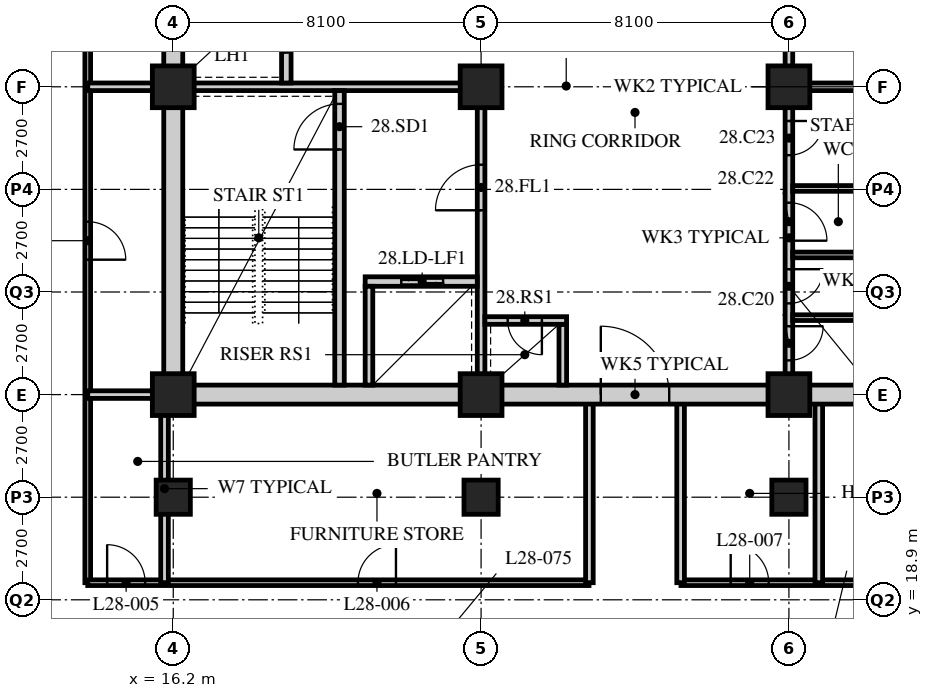
"""IFC4 building model, lengths in metres.
Left out: names, types, materials, properties, quantities, classifications, styles, units other than length and angle.
Written with IfcOpenShell. Run it as: python <this file> out.ifc"""

import sys

from ifc_helpers import new_model, si_unit, direction, frame, frame_2d, origin, origin_2d, place, context, subcontext, project, spatial, rectangle, hollow_rectangle, extrude, element, fill, save


model = new_model("IFC4")
c1 = context("Model", 3, precision=1e-05, world=origin(), true_north=direction((0.0, 1.0)))
c2 = subcontext(c1, "Body", "Model", "MODEL_VIEW")
j1 = project(units=[si_unit("LENGTHUNIT", "METRE"), si_unit("PLANEANGLEUNIT", "RADIAN")], contexts=[c1])
p1 = place(None, origin())
s1 = spatial("IfcSite", under=j1, at=p1, CompositionType="ELEMENT")
p2 = place(p1, origin())
s2 = spatial("IfcBuilding", under=s1, at=p2, CompositionType="ELEMENT")
p3 = place(p2, frame((0.0, 0.0, 113.6)))
s3 = spatial("IfcBuildingStorey", under=s2, at=p3, CompositionType="ELEMENT", Elevation=113.6)
p4 = place(p3, frame((16.2, 21.6, 0.0), z_axis=(0.0, 0.0, 1.0), x_axis=(1.0, 0.0, 0.0)))
e1 = element("IfcColumn", 1, at=p4, inside=s3, PredefinedType="COLUMN", context=c2, shape_type="SweptSolid", body=[
    extrude(hollow_rectangle(XDim=0.9, YDim=0.9, WallThickness=0.09, at=origin_2d()), origin(), (0.0, 0.0, 1.0), 3.4),
])
for number, where, z_axis, x_axis in (
    (2, (16.2, 24.3, 0.0), (0.0, 0.0, 1.0), (1.0, 0.0, 0.0)),
    (3, (16.2, 32.4, 0.0), (0.0, 0.0, 1.0), (1.0, 0.0, 0.0)),
):
    element("IfcColumn", number, at=place(p3, frame(where, z_axis=z_axis, x_axis=x_axis)), inside=s3, PredefinedType="COLUMN", context=c2, shape_type="SweptSolid", body=[
        extrude(hollow_rectangle(XDim=1.1, YDim=1.1, WallThickness=0.1, at=origin_2d()), origin(), (0.0, 0.0, 1.0), 3.4),
    ])
p5 = place(p3, frame((24.3, 21.6, 0.0), z_axis=(0.0, 0.0, 1.0), x_axis=(1.0, 0.0, 0.0)))
e4 = element("IfcColumn", 4, at=p5, inside=s3, PredefinedType="COLUMN", context=c2, shape_type="SweptSolid", body=[
    extrude(hollow_rectangle(XDim=0.9, YDim=0.9, WallThickness=0.09, at=origin_2d()), origin(), (0.0, 0.0, 1.0), 3.4),
])
for number, where, z_axis, x_axis in (
    (5, (24.3, 24.3, 0.0), (0.0, 0.0, 1.0), (1.0, 0.0, 0.0)),
    (6, (24.3, 32.4, 0.0), (0.0, 0.0, 1.0), (1.0, 0.0, 0.0)),
):
    element("IfcColumn", number, at=place(p3, frame(where, z_axis=z_axis, x_axis=x_axis)), inside=s3, PredefinedType="COLUMN", context=c2, shape_type="SweptSolid", body=[
        extrude(hollow_rectangle(XDim=1.1, YDim=1.1, WallThickness=0.1, at=origin_2d()), origin(), (0.0, 0.0, 1.0), 3.4),
    ])
p6 = place(p3, frame((32.4, 21.6, 0.0), z_axis=(0.0, 0.0, 1.0), x_axis=(1.0, 0.0, 0.0)))
e7 = element("IfcColumn", 7, at=p6, inside=s3, PredefinedType="COLUMN", context=c2, shape_type="SweptSolid", body=[
    extrude(hollow_rectangle(XDim=0.9, YDim=0.9, WallThickness=0.09, at=origin_2d()), origin(), (0.0, 0.0, 1.0), 3.4),
])
for number, where, z_axis, x_axis in (
    (8, (32.4, 24.3, 0.0), (0.0, 0.0, 1.0), (1.0, 0.0, 0.0)),
    (9, (32.4, 32.4, 0.0), (0.0, 0.0, 1.0), (1.0, 0.0, 0.0)),
):
    element("IfcColumn", number, at=place(p3, frame(where, z_axis=z_axis, x_axis=x_axis)), inside=s3, PredefinedType="COLUMN", context=c2, shape_type="SweptSolid", body=[
        extrude(hollow_rectangle(XDim=1.1, YDim=1.1, WallThickness=0.1, at=origin_2d()), origin(), (0.0, 0.0, 1.0), 3.4),
    ])
p7 = place(p3, frame((13.95, 44.1, 0.0), z_axis=(0.0, 0.0, 1.0), x_axis=(0.0, -1.0, 0.0)))
e10 = element("IfcWall", 10, at=p7, inside=s3, PredefinedType="PARTITIONING", context=c2, shape_type="SweptSolid", body=[
    extrude(rectangle(XDim=24.75, YDim=0.15, at=frame_2d((12.375, 0.0))), origin(), (0.0, 0.0, 1.0), 3.19),
])
p8 = place(p7, frame((15.25, 0.0, 0.0)))
e11 = element("IfcOpeningElement", 11, at=p8, cuts=e10, PredefinedType="OPENING", context=c2, shape_type="SweptSolid", body=[
    extrude(rectangle(XDim=1.0, YDim=2.1, at=frame_2d((0.5, 1.05))), frame((0.0, 0.085, 0.0), z_axis=(0.0, -1.0, 0.0), x_axis=(1.0, 0.0, 0.0)), (0.0, 0.0, 1.0), 0.17),
])
p9 = place(p7, frame((7.15, 0.0, 0.0)))
e12 = element("IfcOpeningElement", 12, at=p9, cuts=e10, PredefinedType="OPENING", context=c2, shape_type="SweptSolid", body=[
    extrude(rectangle(XDim=1.0, YDim=2.1, at=frame_2d((0.5, 1.05))), frame((0.0, 0.085, 0.0), z_axis=(0.0, -1.0, 0.0), x_axis=(1.0, 0.0, 0.0)), (0.0, 0.0, 1.0), 0.17),
])
p10 = place(p3, frame((13.95, 19.35, 0.0), z_axis=(0.0, 0.0, 1.0), x_axis=(1.0, 0.0, 0.0)))
e13 = element("IfcWall", 13, at=p10, inside=s3, PredefinedType="PARTITIONING", context=c2, shape_type="SweptSolid", body=[
    extrude(rectangle(XDim=13.19, YDim=0.15, at=frame_2d((6.595, 0.0))), origin(), (0.0, 0.0, 1.0), 3.19),
])
p11 = place(p10, frame((0.51, 0.0, 0.0)))
e14 = element("IfcOpeningElement", 14, at=p11, cuts=e13, PredefinedType="OPENING", context=c2, shape_type="SweptSolid", body=[
    extrude(rectangle(XDim=1.0, YDim=2.1, at=frame_2d((0.5, 1.05))), frame((0.0, 0.085, 0.0), z_axis=(0.0, -1.0, 0.0), x_axis=(1.0, 0.0, 0.0)), (0.0, 0.0, 1.0), 0.17),
])
p12 = place(p10, frame((7.11, 0.0, 0.0)))
e15 = element("IfcOpeningElement", 15, at=p12, cuts=e13, PredefinedType="OPENING", context=c2, shape_type="SweptSolid", body=[
    extrude(rectangle(XDim=1.0, YDim=2.1, at=frame_2d((0.5, 1.05))), frame((0.0, 0.085, 0.0), z_axis=(0.0, -1.0, 0.0), x_axis=(1.0, 0.0, 0.0)), (0.0, 0.0, 1.0), 0.17),
])
p13 = place(p3, frame((29.56, 19.35, 0.0), z_axis=(0.0, 0.0, 1.0), x_axis=(1.0, 0.0, 0.0)))
e16 = element("IfcWall", 16, at=p13, inside=s3, PredefinedType="PARTITIONING", context=c2, shape_type="SweptSolid", body=[
    extrude(rectangle(XDim=13.19, YDim=0.15, at=frame_2d((6.595, 0.0))), origin(), (0.0, 0.0, 1.0), 3.19),
])
p14 = place(p13, frame((1.308, 0.0, 0.0)))
e17 = element("IfcOpeningElement", 17, at=p14, cuts=e16, PredefinedType="OPENING", context=c2, shape_type="SweptSolid", body=[
    extrude(rectangle(XDim=1.0, YDim=2.1, at=frame_2d((0.5, 1.05))), frame((0.0, 0.085, 0.0), z_axis=(0.0, -1.0, 0.0), x_axis=(1.0, 0.0, 0.0)), (0.0, 0.0, 1.0), 0.17),
])
p15 = place(p13, frame((7.908, 0.0, 0.0)))
e18 = element("IfcOpeningElement", 18, at=p15, cuts=e16, PredefinedType="OPENING", context=c2, shape_type="SweptSolid", body=[
    extrude(rectangle(XDim=1.0, YDim=2.1, at=frame_2d((0.5, 1.05))), frame((0.0, 0.085, 0.0), z_axis=(0.0, -1.0, 0.0), x_axis=(1.0, 0.0, 0.0)), (0.0, 0.0, 1.0), 0.17),
])
p16 = place(p3, frame((13.95, 32.4, 0.0), z_axis=(0.0, 0.0, 1.0), x_axis=(1.0, 0.0, 0.0)))
e19 = element("IfcWall", 19, at=p16, inside=s3, PredefinedType="SOLIDWALL", context=c2, shape_type="SweptSolid", body=[
    extrude(rectangle(XDim=2.25, YDim=0.2, at=frame_2d((1.125, 0.0))), origin(), (0.0, 0.0, 1.0), 3.19),
])
p17 = place(p3, frame((15.97, 19.35, 0.0), z_axis=(0.0, 0.0, 1.0), x_axis=(0.0, 1.0, 0.0)))
e20 = element("IfcWall", 20, at=p17, inside=s3, PredefinedType="SOLIDWALL", context=c2, shape_type="SweptSolid", body=[
    extrude(rectangle(XDim=4.95, YDim=0.2, at=frame_2d((2.475, 0.0))), origin(), (0.0, 0.0, 1.0), 2.49),
])
for number, where, z_axis, x_axis in (
    (21, (33.186, 19.35, 0.0), (0.0, 0.0, 1.0), (0.0, 1.0, 0.0)),
    (22, (27.15, 19.35, 0.0), (0.0, 0.0, 1.0), (0.0, 1.0, 0.0)),
    (23, (29.55, 19.35, 0.0), (0.0, 0.0, 1.0), (0.0, 1.0, 0.0)),
):
    element("IfcWall", number, at=place(p3, frame(where, z_axis=z_axis, x_axis=x_axis)), inside=s3, PredefinedType="SOLIDWALL", context=c2, shape_type="SweptSolid", body=[
        extrude(rectangle(XDim=4.95, YDim=0.2, at=frame_2d((2.475, 0.0))), origin(), (0.0, 0.0, 1.0), 3.19),
    ])
p18 = place(p3, frame((13.95, 24.3, 0.0), z_axis=(0.0, 0.0, 1.0), x_axis=(1.0, 0.0, 0.0)))
e24 = element("IfcWall", 24, at=p18, inside=s3, PredefinedType="SOLIDWALL", context=c2, shape_type="SweptSolid", body=[
    extrude(rectangle(XDim=2.25, YDim=0.2, at=frame_2d((1.125, 0.0))), origin(), (0.0, 0.0, 1.0), 3.19),
])
p19 = place(p3, frame((15.95, 24.3, 0.0), z_axis=(0.0, 0.0, 1.0), x_axis=(1.0, 0.0, 0.0)))
e25 = element("IfcWall", 25, at=p19, inside=s3, PredefinedType="SOLIDWALL", context=c2, shape_type="SweptSolid", body=[
    extrude(rectangle(XDim=24.8, YDim=0.5, at=frame_2d((12.4, 0.0))), origin(), (0.0, 0.0, 1.0), 2.54),
])
p20 = place(p19, frame((11.5, 0.0, 0.0)))
e26 = element("IfcOpeningElement", 26, at=p20, cuts=e25, PredefinedType="OPENING", context=c2, shape_type="SweptSolid", body=[
    extrude(rectangle(XDim=1.8, YDim=2.4, at=frame_2d((0.9, 1.2))), frame((0.0, 0.26, 0.0), z_axis=(0.0, -1.0, 0.0), x_axis=(1.0, 0.0, 0.0)), (0.0, 0.0, 1.0), 0.52),
])
p21 = place(p3, frame((16.2, 24.55, 0.0), z_axis=(0.0, 0.0, 1.0), x_axis=(0.0, 1.0, 0.0)))
e27 = element("IfcWall", 27, at=p21, inside=s3, PredefinedType="SOLIDWALL", context=c2, shape_type="SweptSolid", body=[
    extrude(rectangle(XDim=15.7, YDim=0.5, at=frame_2d((7.85, 0.0))), origin(), (0.0, 0.0, 1.0), 2.578),
])
p22 = place(p3, frame((16.45, 32.4, 0.0), z_axis=(0.0, 0.0, 1.0), x_axis=(1.0, 0.0, 0.0)))
e28 = element("IfcWall", 28, at=p22, inside=s3, PredefinedType="SOLIDWALL", context=c2, shape_type="SweptSolid", body=[
    extrude(rectangle(XDim=7.95, YDim=0.2, at=frame_2d((3.975, 0.0))), origin(), (0.0, 0.0, 1.0), 2.578),
])
p23 = place(p3, frame((24.3, 24.55, 0.0), z_axis=(0.0, 0.0, 1.0), x_axis=(0.0, 1.0, 0.0)))
e29 = element("IfcWall", 29, at=p23, inside=s3, PredefinedType="SOLIDWALL", context=c2, shape_type="SweptSolid", body=[
    extrude(rectangle(XDim=7.75, YDim=0.2, at=frame_2d((3.875, 0.0))), origin(), (0.0, 0.0, 1.0), 2.578),
])
p24 = place(p23, frame((4.6, 0.0, 0.0)))
e30 = element("IfcOpeningElement", 30, at=p24, cuts=e29, PredefinedType="OPENING", context=c2, shape_type="SweptSolid", body=[
    extrude(rectangle(XDim=1.2, YDim=2.1, at=frame_2d((0.6, 1.05))), frame((0.0, 0.11, 0.0), z_axis=(0.0, -1.0, 0.0), x_axis=(1.0, 0.0, 0.0)), (0.0, 0.0, 1.0), 0.22),
])
p25 = place(p3, frame((20.575, 24.55, 0.0), z_axis=(0.0, 0.0, 1.0), x_axis=(0.0, 1.0, 0.0)))
e31 = element("IfcWall", 31, at=p25, inside=s3, PredefinedType="SOLIDWALL", context=c2, shape_type="SweptSolid", body=[
    extrude(rectangle(XDim=7.75, YDim=0.25, at=frame_2d((3.875, 0.0))), origin(), (0.0, 0.0, 1.0), 3.19),
])
p26 = place(p25, frame((6.2, 0.0, 0.0)))
e32 = element("IfcOpeningElement", 32, at=p26, cuts=e31, PredefinedType="OPENING", context=c2, shape_type="SweptSolid", body=[
    extrude(rectangle(XDim=1.2, YDim=2.1, at=frame_2d((0.6, 1.05))), frame((0.0, 0.135, 0.0), z_axis=(0.0, -1.0, 0.0), x_axis=(1.0, 0.0, 0.0)), (0.0, 0.0, 1.0), 0.27),
])
p27 = place(p3, frame((21.25, 27.275, 0.0), z_axis=(0.0, 0.0, 1.0), x_axis=(1.0, 0.0, 0.0)))
e33 = element("IfcWall", 33, at=p27, inside=s3, PredefinedType="SOLIDWALL", context=c2, shape_type="SweptSolid", body=[
    extrude(rectangle(XDim=2.95, YDim=0.25, at=frame_2d((1.475, 0.0))), origin(), (0.0, 0.0, 1.0), 3.19),
])
p28 = place(p27, frame((0.95, 0.0, 0.0)))
e34 = element("IfcOpeningElement", 34, at=p28, cuts=e33, PredefinedType="OPENING", context=c2, shape_type="SweptSolid", body=[
    extrude(rectangle(XDim=1.1, YDim=2.4, at=frame_2d((0.55, 1.2))), frame((0.0, 0.135, 0.0), z_axis=(0.0, -1.0, 0.0), x_axis=(1.0, 0.0, 0.0)), (0.0, 0.0, 1.0), 0.27),
])
p29 = place(p3, frame((21.35, 24.55, 0.0), z_axis=(0.0, 0.0, 1.0), x_axis=(0.0, 1.0, 0.0)))
e35 = element("IfcWall", 35, at=p29, inside=s3, PredefinedType="SOLIDWALL", context=c2, shape_type="SweptSolid", body=[
    extrude(rectangle(XDim=2.6, YDim=0.2, at=frame_2d((1.3, 0.0))), origin(), (0.0, 0.0, 1.0), 3.19),
])
p30 = place(p3, frame((19.175, 32.5, 0.0), z_axis=(0.0, 0.0, 1.0), x_axis=(0.0, 1.0, 0.0)))
e36 = element("IfcWall", 36, at=p30, inside=s3, PredefinedType="SOLIDWALL", context=c2, shape_type="SweptSolid", body=[
    extrude(rectangle(XDim=7.75, YDim=0.25, at=frame_2d((3.875, 0.0))), origin(), (0.0, 0.0, 1.0), 3.19),
])
p31 = place(p30, frame((0.8, 0.0, 0.0)))
e37 = element("IfcOpeningElement", 37, at=p31, cuts=e36, PredefinedType="OPENING", context=c2, shape_type="SweptSolid", body=[
    extrude(rectangle(XDim=1.1, YDim=2.4, at=frame_2d((0.55, 1.2))), frame((0.0, 0.135, 0.0), z_axis=(0.0, -1.0, 0.0), x_axis=(1.0, 0.0, 0.0)), (0.0, 0.0, 1.0), 0.27),
])
p32 = place(p30, frame((3.4, 0.0, 0.0)))
e38 = element("IfcOpeningElement", 38, at=p32, cuts=e36, PredefinedType="OPENING", context=c2, shape_type="SweptSolid", body=[
    extrude(rectangle(XDim=1.1, YDim=2.4, at=frame_2d((0.55, 1.2))), frame((0.0, 0.135, 0.0), z_axis=(0.0, -1.0, 0.0), x_axis=(1.0, 0.0, 0.0)), (0.0, 0.0, 1.0), 0.27),
])
p33 = place(p30, frame((6.0, 0.0, 0.0)))
e39 = element("IfcOpeningElement", 39, at=p33, cuts=e36, PredefinedType="OPENING", context=c2, shape_type="SweptSolid", body=[
    extrude(rectangle(XDim=1.1, YDim=2.4, at=frame_2d((0.55, 1.2))), frame((0.0, 0.135, 0.0), z_axis=(0.0, -1.0, 0.0), x_axis=(1.0, 0.0, 0.0)), (0.0, 0.0, 1.0), 0.27),
])
p34 = place(p3, frame((26.45, 24.55, 0.0), z_axis=(0.0, 0.0, 1.0), x_axis=(0.0, 1.0, 0.0)))
e40 = element("IfcWall", 40, at=p34, inside=s3, PredefinedType="SOLIDWALL", context=c2, shape_type="SweptSolid", body=[
    extrude(rectangle(XDim=1.6, YDim=0.2, at=frame_2d((0.8, 0.0))), origin(), (0.0, 0.0, 1.0), 3.19),
])
p35 = place(p3, frame((24.4, 26.25, 0.0), z_axis=(0.0, 0.0, 1.0), x_axis=(1.0, 0.0, 0.0)))
e41 = element("IfcWall", 41, at=p35, inside=s3, PredefinedType="SOLIDWALL", context=c2, shape_type="SweptSolid", body=[
    extrude(rectangle(XDim=2.15, YDim=0.2, at=frame_2d((1.075, 0.0))), origin(), (0.0, 0.0, 1.0), 3.19),
])
p36 = place(p35, frame((0.6, 0.0, 0.0)))
e42 = element("IfcOpeningElement", 42, at=p36, cuts=e41, PredefinedType="OPENING", context=c2, shape_type="SweptSolid", body=[
    extrude(rectangle(XDim=0.9, YDim=2.1, at=frame_2d((0.45, 1.05))), frame((0.0, 0.11, 0.0), z_axis=(0.0, -1.0, 0.0), x_axis=(1.0, 0.0, 0.0)), (0.0, 0.0, 1.0), 0.22),
])
p37 = place(p3, frame((32.3, 32.4, 0.0), z_axis=(0.0, 0.0, 1.0), x_axis=(1.0, 0.0, 0.0)))
e43 = element("IfcWall", 43, at=p37, inside=s3, PredefinedType="SOLIDWALL", context=c2, shape_type="SweptSolid", body=[
    extrude(rectangle(XDim=7.95, YDim=0.2, at=frame_2d((3.975, 0.0))), origin(), (0.0, 0.0, 1.0), 2.578),
])
p38 = place(p3, frame((32.4, 32.5, 0.0), z_axis=(0.0, 0.0, 1.0), x_axis=(0.0, 1.0, 0.0)))
e44 = element("IfcWall", 44, at=p38, inside=s3, PredefinedType="SOLIDWALL", context=c2, shape_type="SweptSolid", body=[
    extrude(rectangle(XDim=7.75, YDim=0.2, at=frame_2d((3.875, 0.0))), origin(), (0.0, 0.0, 1.0), 2.578),
])
p39 = place(p38, frame((1.9, 0.0, 0.0)))
e45 = element("IfcOpeningElement", 45, at=p39, cuts=e44, PredefinedType="OPENING", context=c2, shape_type="SweptSolid", body=[
    extrude(rectangle(XDim=1.2, YDim=2.1, at=frame_2d((0.6, 1.05))), frame((0.0, 0.11, 0.0), z_axis=(0.0, -1.0, 0.0), x_axis=(1.0, 0.0, 0.0)), (0.0, 0.0, 1.0), 0.22),
])
p40 = place(p3, frame((32.4, 24.55, 0.0), z_axis=(0.0, 0.0, 1.0), x_axis=(0.0, 1.0, 0.0)))
e46 = element("IfcWall", 46, at=p40, inside=s3, PredefinedType="PARTITIONING", context=c2, shape_type="SweptSolid", body=[
    extrude(rectangle(XDim=7.75, YDim=0.2, at=frame_2d((3.875, 0.0))), origin(), (0.0, 0.0, 1.0), 2.578),
])
p41 = place(p40, frame((0.65, 0.0, 0.0)))
e47 = element("IfcOpeningElement", 47, at=p41, cuts=e46, PredefinedType="OPENING", context=c2, shape_type="SweptSolid", body=[
    extrude(rectangle(XDim=0.9, YDim=2.1, at=frame_2d((0.45, 1.05))), frame((0.0, 0.11, 0.0), z_axis=(0.0, -1.0, 0.0), x_axis=(1.0, 0.0, 0.0)), (0.0, 0.0, 1.0), 0.22),
])
p42 = place(p40, frame((2.15, 0.0, 0.0)))
e48 = element("IfcOpeningElement", 48, at=p42, cuts=e46, PredefinedType="OPENING", context=c2, shape_type="SweptSolid", body=[
    extrude(rectangle(XDim=0.9, YDim=2.1, at=frame_2d((0.45, 1.05))), frame((0.0, 0.11, 0.0), z_axis=(0.0, -1.0, 0.0), x_axis=(1.0, 0.0, 0.0)), (0.0, 0.0, 1.0), 0.22),
])
p43 = place(p40, frame((3.8, 0.0, 0.0)))
e49 = element("IfcOpeningElement", 49, at=p43, cuts=e46, PredefinedType="OPENING", context=c2, shape_type="SweptSolid", body=[
    extrude(rectangle(XDim=1.0, YDim=2.1, at=frame_2d((0.5, 1.05))), frame((0.0, 0.11, 0.0), z_axis=(0.0, -1.0, 0.0), x_axis=(1.0, 0.0, 0.0)), (0.0, 0.0, 1.0), 0.22),
])
p44 = place(p40, frame((6.05, 0.0, 0.0)))
e50 = element("IfcOpeningElement", 50, at=p44, cuts=e46, PredefinedType="OPENING", context=c2, shape_type="SweptSolid", body=[
    extrude(rectangle(XDim=0.9, YDim=2.1, at=frame_2d((0.45, 1.05))), frame((0.0, 0.11, 0.0), z_axis=(0.0, -1.0, 0.0), x_axis=(1.0, 0.0, 0.0)), (0.0, 0.0, 1.0), 0.22),
])
for number, where, z_axis, x_axis in (
    (51, (32.5, 26.325, 0.0), (0.0, 0.0, 1.0), (1.0, 0.0, 0.0)),
    (52, (32.5, 27.975, 0.0), (0.0, 0.0, 1.0), (1.0, 0.0, 0.0)),
):
    element("IfcWall", number, at=place(p3, frame(where, z_axis=z_axis, x_axis=x_axis)), inside=s3, PredefinedType="PARTITIONING", context=c2, shape_type="SweptSolid", body=[
        extrude(rectangle(XDim=2.55, YDim=0.15, at=frame_2d((1.275, 0.0))), origin(), (0.0, 0.0, 1.0), 3.19),
    ])
p45 = place(p3, frame((32.5, 29.725, 0.0), z_axis=(0.0, 0.0, 1.0), x_axis=(1.0, 0.0, 0.0)))
e53 = element("IfcWall", 53, at=p45, inside=s3, PredefinedType="PARTITIONING", context=c2, shape_type="SweptSolid", body=[
    extrude(rectangle(XDim=2.4, YDim=0.15, at=frame_2d((1.2, 0.0))), origin(), (0.0, 0.0, 1.0), 3.19),
])
p46 = place(p8, origin())
e54 = element("IfcDoor", 54, at=p46, inside=s3, OperationType="SINGLE_SWING_RIGHT", PredefinedType="DOOR", context=c2, shape_type="SweptSolid", body=[
    extrude(rectangle(XDim=1.0, YDim=2.1, at=frame_2d((0.5, 1.05))), frame((0.0, 0.025, 0.0), z_axis=(0.0, -1.0, 0.0), x_axis=(1.0, 0.0, 0.0)), (0.0, 0.0, 1.0), 0.05),
])
fill(e11, e54)
p47 = place(p11, origin())
e55 = element("IfcDoor", 55, at=p47, inside=s3, OperationType="SINGLE_SWING_LEFT", PredefinedType="DOOR", context=c2, shape_type="SweptSolid", body=[
    extrude(rectangle(XDim=1.0, YDim=2.1, at=frame_2d((0.5, 1.05))), frame((0.0, 0.025, 0.0), z_axis=(0.0, -1.0, 0.0), x_axis=(1.0, 0.0, 0.0)), (0.0, 0.0, 1.0), 0.05),
])
fill(e14, e55)
p48 = place(p12, origin())
e56 = element("IfcDoor", 56, at=p48, inside=s3, OperationType="SINGLE_SWING_RIGHT", PredefinedType="DOOR", context=c2, shape_type="SweptSolid", body=[
    extrude(rectangle(XDim=1.0, YDim=2.1, at=frame_2d((0.5, 1.05))), frame((0.0, 0.025, 0.0), z_axis=(0.0, -1.0, 0.0), x_axis=(1.0, 0.0, 0.0)), (0.0, 0.0, 1.0), 0.05),
])
fill(e15, e56)
p49 = place(p14, origin())
e57 = element("IfcDoor", 57, at=p49, inside=s3, OperationType="SINGLE_SWING_LEFT", PredefinedType="DOOR", context=c2, shape_type="SweptSolid", body=[
    extrude(rectangle(XDim=1.0, YDim=2.1, at=frame_2d((0.5, 1.05))), frame((0.0, 0.025, 0.0), z_axis=(0.0, -1.0, 0.0), x_axis=(1.0, 0.0, 0.0)), (0.0, 0.0, 1.0), 0.05),
])
fill(e17, e57)
p50 = place(p41, origin())
e58 = element("IfcDoor", 58, at=p50, inside=s3, OperationType="SINGLE_SWING_LEFT", PredefinedType="DOOR", context=c2, shape_type="SweptSolid", body=[
    extrude(rectangle(XDim=0.9, YDim=2.1, at=frame_2d((0.45, 1.05))), frame((0.0, 0.025, 0.0), z_axis=(0.0, -1.0, 0.0), x_axis=(1.0, 0.0, 0.0)), (0.0, 0.0, 1.0), 0.05),
])
fill(e47, e58)
p51 = place(p42, origin())
e59 = element("IfcDoor", 59, at=p51, inside=s3, OperationType="SINGLE_SWING_LEFT", PredefinedType="DOOR", context=c2, shape_type="SweptSolid", body=[
    extrude(rectangle(XDim=0.9, YDim=2.1, at=frame_2d((0.45, 1.05))), frame((0.0, 0.025, 0.0), z_axis=(0.0, -1.0, 0.0), x_axis=(1.0, 0.0, 0.0)), (0.0, 0.0, 1.0), 0.05),
])
fill(e48, e59)
p52 = place(p43, origin())
e60 = element("IfcDoor", 60, at=p52, inside=s3, OperationType="SINGLE_SWING_RIGHT", PredefinedType="DOOR", context=c2, shape_type="SweptSolid", body=[
    extrude(rectangle(XDim=1.0, YDim=2.1, at=frame_2d((0.5, 1.05))), frame((0.0, 0.025, 0.0), z_axis=(0.0, -1.0, 0.0), x_axis=(1.0, 0.0, 0.0)), (0.0, 0.0, 1.0), 0.05),
])
fill(e49, e60)
p53 = place(p44, origin())
e61 = element("IfcDoor", 61, at=p53, inside=s3, OperationType="SINGLE_SWING_LEFT", PredefinedType="DOOR", context=c2, shape_type="SweptSolid", body=[
    extrude(rectangle(XDim=0.9, YDim=2.1, at=frame_2d((0.45, 1.05))), frame((0.0, 0.025, 0.0), z_axis=(0.0, -1.0, 0.0), x_axis=(1.0, 0.0, 0.0)), (0.0, 0.0, 1.0), 0.05),
])
fill(e50, e61)
p54 = place(p26, origin())
e62 = element("IfcDoor", 62, at=p54, inside=s3, OperationType="SINGLE_SWING_LEFT", PredefinedType="DOOR", context=c2, shape_type="SweptSolid", body=[
    extrude(rectangle(XDim=1.2, YDim=2.1, at=frame_2d((0.6, 1.05))), frame((0.0, 0.025, 0.0), z_axis=(0.0, -1.0, 0.0), x_axis=(1.0, 0.0, 0.0)), (0.0, 0.0, 1.0), 0.05),
])
fill(e32, e62)
p55 = place(p24, origin())
e63 = element("IfcDoor", 63, at=p55, inside=s3, OperationType="SINGLE_SWING_LEFT", PredefinedType="DOOR", context=c2, shape_type="SweptSolid", body=[
    extrude(rectangle(XDim=1.2, YDim=2.1, at=frame_2d((0.6, 1.05))), frame((0.0, 0.025, 0.0), z_axis=(0.0, -1.0, 0.0), x_axis=(1.0, 0.0, 0.0)), (0.0, 0.0, 1.0), 0.05),
])
fill(e30, e63)
p56 = place(p36, origin())
e64 = element("IfcDoor", 64, at=p56, inside=s3, OperationType="SINGLE_SWING_LEFT", PredefinedType="DOOR", context=c2, shape_type="SweptSolid", body=[
    extrude(rectangle(XDim=0.9, YDim=2.1, at=frame_2d((0.45, 1.05))), frame((0.0, 0.025, 0.0), z_axis=(0.0, -1.0, 0.0), x_axis=(1.0, 0.0, 0.0)), (0.0, 0.0, 1.0), 0.05),
])
fill(e42, e64)
p57 = place(p31, origin())
e65 = element("IfcDoor", 65, at=p57, inside=s3, OperationType="DOUBLE_DOOR_SLIDING", PredefinedType="DOOR", context=c2, shape_type="SweptSolid", body=[
    extrude(rectangle(XDim=1.1, YDim=2.4, at=frame_2d((0.55, 1.2))), frame((0.0, 0.025, 0.0), z_axis=(0.0, -1.0, 0.0), x_axis=(1.0, 0.0, 0.0)), (0.0, 0.0, 1.0), 0.05),
])
fill(e37, e65)
p58 = place(p28, origin())
e66 = element("IfcDoor", 66, at=p58, inside=s3, OperationType="DOUBLE_DOOR_SLIDING", PredefinedType="DOOR", context=c2, shape_type="SweptSolid", body=[
    extrude(rectangle(XDim=1.1, YDim=2.4, at=frame_2d((0.55, 1.2))), frame((0.0, 0.025, 0.0), z_axis=(0.0, -1.0, 0.0), x_axis=(1.0, 0.0, 0.0)), (0.0, 0.0, 1.0), 0.05),
])
fill(e34, e66)
p59 = place(p20, origin())
e67 = element("IfcDoor", 67, at=p59, inside=s3, OperationType="DOUBLE_DOOR_SINGLE_SWING", PredefinedType="DOOR", context=c2, shape_type="SweptSolid", body=[
    extrude(rectangle(XDim=1.8, YDim=2.4, at=frame_2d((0.9, 1.2))), frame((0.0, 0.025, 0.0), z_axis=(0.0, -1.0, 0.0), x_axis=(1.0, 0.0, 0.0)), (0.0, 0.0, 1.0), 0.05),
])
fill(e26, e67)
save(model, sys.argv[1])
